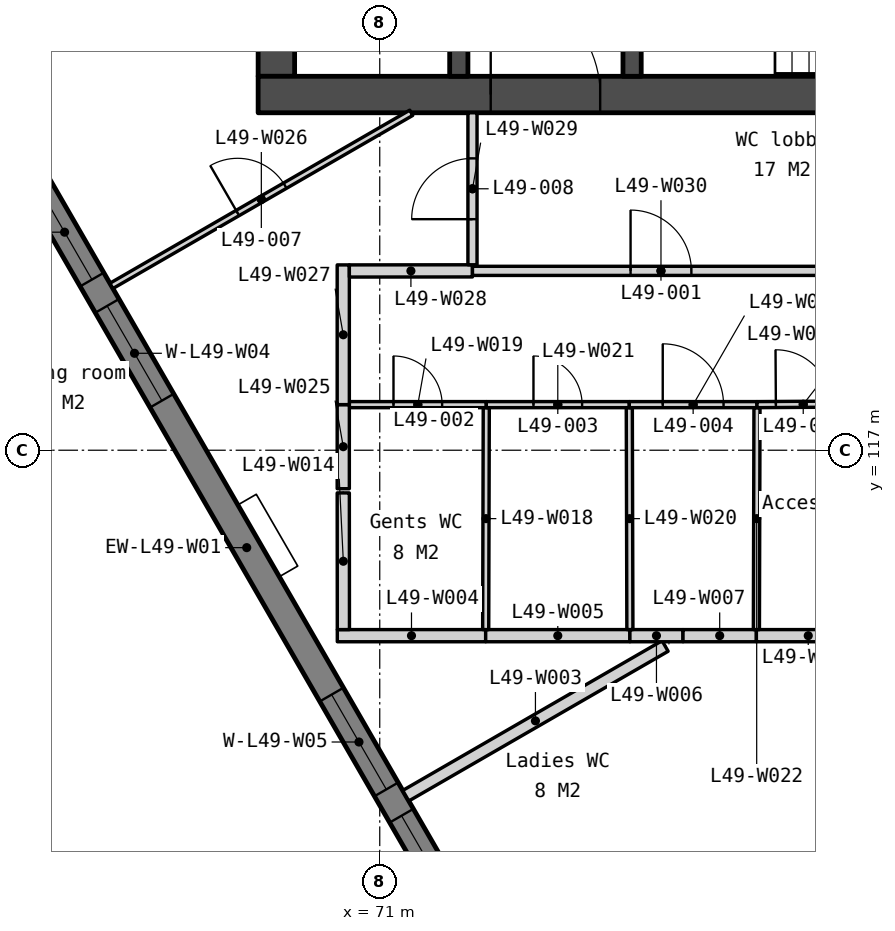
"""IFC4 building model, lengths in metres.
Left out: names, types, materials, properties, quantities, classifications, styles, units other than length and angle.
Written with IfcOpenShell. Run it as: python <this file> out.ifc"""

import sys

from ifc_helpers import new_model, si_unit, direction, frame, frame_2d, origin, place, context, subcontext, project, spatial, polyline, rectangle, outline, extrude, element, fill, save


model = new_model("IFC4")
c1 = context("Model", 3, precision=1e-05, world=origin(), true_north=direction((0.0, 1.0)))
c2 = subcontext(c1, "Body", "Model", "MODEL_VIEW")
j1 = project(units=[si_unit("LENGTHUNIT", "METRE"), si_unit("PLANEANGLEUNIT", "RADIAN")], contexts=[c1])
p1 = place(None, origin())
s1 = spatial("IfcSite", under=j1, at=p1, CompositionType="ELEMENT")
p2 = place(p1, origin())
s2 = spatial("IfcBuilding", under=s1, at=p2, CompositionType="ELEMENT")
p3 = place(p2, frame((0.0, 0.0, 195.8)))
s3 = spatial("IfcBuildingStorey", under=s2, at=p3, CompositionType="ELEMENT", Elevation=195.8)
p4 = place(p3, frame((69.3, 133.95, 0.0), z_axis=(0.0, 0.0, 1.0), x_axis=(0.0, -1.0, 0.0)))
e1 = element("IfcWall", 1, at=p4, inside=s3, PredefinedType="SOLIDWALL", context=c2, shape_type="SweptSolid", body=[
    extrude(rectangle(XDim=10.8, YDim=0.6, at=frame_2d((5.4, 0.0))), origin(), (0.0, 0.0, 1.0), 3.75),
])
p5 = place(p3, frame((69.0, 122.85, 0.0), z_axis=(0.0, 0.0, 1.0), x_axis=(1.0, 0.0, 0.0)))
e2 = element("IfcWall", 2, at=p5, inside=s3, PredefinedType="SOLIDWALL", context=c2, shape_type="SweptSolid", body=[
    extrude(rectangle(XDim=22.0, YDim=0.6, at=frame_2d((11.0, 0.0))), origin(), (0.0, 0.0, 1.0), 3.75),
])
p6 = place(p5, frame((16.375, 0.0, 0.0)))
e3 = element("IfcOpeningElement", 3, at=p6, cuts=e2, PredefinedType="OPENING", context=c2, shape_type="SweptSolid", body=[
    extrude(rectangle(XDim=1.8, YDim=2.1, at=frame_2d((0.9, 1.05))), frame((0.0, 0.31, 0.0), z_axis=(0.0, -1.0, 0.0), x_axis=(1.0, 0.0, 0.0)), (0.0, 0.0, 1.0), 0.62),
])
p7 = place(p5, frame((3.825, 0.0, 0.0)))
e4 = element("IfcOpeningElement", 4, at=p7, cuts=e2, PredefinedType="OPENING", context=c2, shape_type="SweptSolid", body=[
    extrude(rectangle(XDim=1.8, YDim=2.1, at=frame_2d((0.9, 1.05))), frame((0.0, 0.31, 0.0), z_axis=(0.0, -1.0, 0.0), x_axis=(1.0, 0.0, 0.0)), (0.0, 0.0, 1.0), 0.62),
])
p8 = place(p5, frame((12.85, 0.0, 0.0)))
e5 = element("IfcOpeningElement", 5, at=p8, cuts=e2, PredefinedType="OPENING", context=c2, shape_type="SweptSolid", body=[
    extrude(rectangle(XDim=1.5, YDim=2.1, at=frame_2d((0.75, 1.05))), frame((0.0, 0.31, 0.0), z_axis=(0.0, -1.0, 0.0), x_axis=(1.0, 0.0, 0.0)), (0.0, 0.0, 1.0), 0.62),
])
p9 = place(p3, frame((72.3, 133.95, 0.0), z_axis=(0.0, 0.0, 1.0), x_axis=(0.0, -1.0, 0.0)))
e6 = element("IfcWall", 6, at=p9, inside=s3, PredefinedType="SOLIDWALL", context=c2, shape_type="SweptSolid", body=[
    extrude(rectangle(XDim=10.8, YDim=0.3, at=frame_2d((5.4, 0.0))), origin(), (0.0, 0.0, 1.0), 3.75),
])
p10 = place(p9, frame((6.95, 0.0, 0.0)))
e7 = element("IfcOpeningElement", 7, at=p10, cuts=e6, PredefinedType="OPENING", context=c2, shape_type="SweptSolid", body=[
    extrude(rectangle(XDim=1.1, YDim=2.1, at=frame_2d((0.55, 1.05))), frame((0.0, 0.16, 0.0), z_axis=(0.0, -1.0, 0.0), x_axis=(1.0, 0.0, 0.0)), (0.0, 0.0, 1.0), 0.32),
])
p11 = place(p9, frame((9.35, 0.0, 0.0)))
e8 = element("IfcOpeningElement", 8, at=p11, cuts=e6, PredefinedType="OPENING", context=c2, shape_type="SweptSolid", body=[
    extrude(rectangle(XDim=0.9, YDim=2.1, at=frame_2d((0.45, 1.05))), frame((0.0, 0.16, 0.0), z_axis=(0.0, -1.0, 0.0), x_axis=(1.0, 0.0, 0.0)), (0.0, 0.0, 1.0), 0.32),
])
p12 = place(p9, frame((5.1, 0.0, 0.0)))
e9 = element("IfcOpeningElement", 9, at=p12, cuts=e6, PredefinedType="OPENING", context=c2, shape_type="SweptSolid", body=[
    extrude(rectangle(XDim=1.0, YDim=2.1, at=frame_2d((0.5, 1.05))), frame((0.0, 0.16, 0.0), z_axis=(0.0, -1.0, 0.0), x_axis=(1.0, 0.0, 0.0)), (0.0, 0.0, 1.0), 0.32),
])
p13 = place(p3, frame((75.15, 125.7, 0.0), z_axis=(0.0, 0.0, 1.0), x_axis=(0.0, -1.0, 0.0)))
e10 = element("IfcWall", 10, at=p13, inside=s3, PredefinedType="SOLIDWALL", context=c2, shape_type="SweptSolid", body=[
    extrude(rectangle(XDim=2.55, YDim=0.3, at=frame_2d((1.275, 0.0))), origin(), (0.0, 0.0, 1.0), 3.75),
])
p14 = place(p3, frame((59.13, 132.168, -0.15), z_axis=(0.0, 0.0, 1.0), x_axis=(0.500002199942, -0.866024133644, 0.0)))
e11 = element("IfcWall", 11, at=p14, inside=s3, PredefinedType="SOLIDWALL", context=c2, shape_type="SweptSolid", body=[
    extrude(outline(polyline([(38.729, 0.0), (38.729, 3.9), (0.0, 3.9), (0.0, 0.0), (38.729, 0.0)])), frame((0.0, 0.225, 0.0), z_axis=(0.0, -1.0, 0.0), x_axis=(1.0, 0.0, 0.0)), (0.0, 0.0, 1.0), 0.45),
])
p15 = place(p14, frame((2.791, 0.0, 0.95)))
e12 = element("IfcOpeningElement", 12, at=p15, cuts=e11, PredefinedType="OPENING", context=c2, shape_type="SweptSolid", body=[
    extrude(rectangle(XDim=1.8, YDim=2.2, at=frame_2d((0.9, 1.1))), frame((0.0, 0.235, 0.0), z_axis=(0.0, -1.0, 0.0), x_axis=(1.0, 0.0, 0.0)), (0.0, 0.0, 1.0), 0.47),
])
p16 = place(p14, frame((5.091, 0.0, 0.95)))
e13 = element("IfcOpeningElement", 13, at=p16, cuts=e11, PredefinedType="OPENING", context=c2, shape_type="SweptSolid", body=[
    extrude(rectangle(XDim=1.8, YDim=2.2, at=frame_2d((0.9, 1.1))), frame((0.0, 0.235, 0.0), z_axis=(0.0, -1.0, 0.0), x_axis=(1.0, 0.0, 0.0)), (0.0, 0.0, 1.0), 0.47),
])
p17 = place(p14, frame((12.473, 0.0, 0.95)))
e14 = element("IfcOpeningElement", 14, at=p17, cuts=e11, PredefinedType="OPENING", context=c2, shape_type="SweptSolid", body=[
    extrude(rectangle(XDim=1.8, YDim=2.2, at=frame_2d((0.9, 1.1))), frame((0.0, 0.235, 0.0), z_axis=(0.0, -1.0, 0.0), x_axis=(1.0, 0.0, 0.0)), (0.0, 0.0, 1.0), 0.47),
])
p18 = place(p14, frame((14.773, 0.0, 0.95)))
e15 = element("IfcOpeningElement", 15, at=p18, cuts=e11, PredefinedType="OPENING", context=c2, shape_type="SweptSolid", body=[
    extrude(rectangle(XDim=1.8, YDim=2.2, at=frame_2d((0.9, 1.1))), frame((0.0, 0.235, 0.0), z_axis=(0.0, -1.0, 0.0), x_axis=(1.0, 0.0, 0.0)), (0.0, 0.0, 1.0), 0.47),
])
p19 = place(p14, frame((22.156, 0.0, 0.95)))
e16 = element("IfcOpeningElement", 16, at=p19, cuts=e11, PredefinedType="OPENING", context=c2, shape_type="SweptSolid", body=[
    extrude(rectangle(XDim=1.8, YDim=2.2, at=frame_2d((0.9, 1.1))), frame((0.0, 0.235, 0.0), z_axis=(0.0, -1.0, 0.0), x_axis=(1.0, 0.0, 0.0)), (0.0, 0.0, 1.0), 0.47),
])
p20 = place(p14, frame((24.456, 0.0, 0.95)))
e17 = element("IfcOpeningElement", 17, at=p20, cuts=e11, PredefinedType="OPENING", context=c2, shape_type="SweptSolid", body=[
    extrude(rectangle(XDim=1.8, YDim=2.2, at=frame_2d((0.9, 1.1))), frame((0.0, 0.235, 0.0), z_axis=(0.0, -1.0, 0.0), x_axis=(1.0, 0.0, 0.0)), (0.0, 0.0, 1.0), 0.47),
])
p21 = place(p14, frame((31.838, 0.0, 0.95)))
e18 = element("IfcOpeningElement", 18, at=p21, cuts=e11, PredefinedType="OPENING", context=c2, shape_type="SweptSolid", body=[
    extrude(rectangle(XDim=1.8, YDim=2.2, at=frame_2d((0.9, 1.1))), frame((0.0, 0.235, 0.0), z_axis=(0.0, -1.0, 0.0), x_axis=(1.0, 0.0, 0.0)), (0.0, 0.0, 1.0), 0.47),
])
p22 = place(p14, frame((34.138, 0.0, 0.95)))
e19 = element("IfcOpeningElement", 19, at=p22, cuts=e11, PredefinedType="OPENING", context=c2, shape_type="SweptSolid", body=[
    extrude(rectangle(XDim=1.8, YDim=2.2, at=frame_2d((0.9, 1.1))), frame((0.0, 0.235, 0.0), z_axis=(0.0, -1.0, 0.0), x_axis=(1.0, 0.0, 0.0)), (0.0, 0.0, 1.0), 0.47),
])
p23 = place(p3, frame((73.849, 107.125, 0.0), z_axis=(0.0, 0.0, 1.0), x_axis=(0.866035511351, 0.499982492772, 0.0)))
e20 = element("IfcWall", 20, at=p23, inside=s3, PredefinedType="PARTITIONING", context=c2, shape_type="SweptSolid", body=[
    extrude(rectangle(XDim=7.016, YDim=0.1, at=frame_2d((3.508, 0.0))), origin(), (0.0, 0.0, 1.0), 3.75),
])
p24 = place(p3, frame((71.428, 111.318, 0.0), z_axis=(0.0, 0.0, 1.0), x_axis=(0.86601964755, 0.500009969958, 0.0)))
e21 = element("IfcWall", 21, at=p24, inside=s3, PredefinedType="PARTITIONING", context=c2, shape_type="SweptSolid", body=[
    extrude(rectangle(XDim=4.925, YDim=0.2, at=frame_2d((2.462, 0.0))), origin(), (0.0, 0.0, 1.0), 3.75),
])
p25 = place(p3, frame((70.302, 113.95, 0.0), z_axis=(0.0, 0.0, 1.0), x_axis=(1.0, 0.0, 0.0)))
e22 = element("IfcWall", 22, at=p25, inside=s3, PredefinedType="PARTITIONING", context=c2, shape_type="SweptSolid", body=[
    extrude(rectangle(XDim=2.44, YDim=0.2, at=frame_2d((1.22, 0.0))), origin(), (0.0, 0.0, 1.0), 3.75),
])
p26 = place(p3, frame((72.742, 113.95, 0.0), z_axis=(0.0, 0.0, 1.0), x_axis=(1.0, 0.0, 0.0)))
e23 = element("IfcWall", 23, at=p26, inside=s3, PredefinedType="PARTITIONING", context=c2, shape_type="SweptSolid", body=[
    extrude(rectangle(XDim=2.372, YDim=0.2, at=frame_2d((1.186, 0.0))), origin(), (0.0, 0.0, 1.0), 3.75),
])
p27 = place(p3, frame((75.114, 113.95, 0.0), z_axis=(0.0, 0.0, 1.0), x_axis=(1.0, 0.0, 0.0)))
e24 = element("IfcWall", 24, at=p27, inside=s3, PredefinedType="PARTITIONING", context=c2, shape_type="SweptSolid", body=[
    extrude(rectangle(XDim=0.873, YDim=0.2, at=frame_2d((0.437, 0.0))), origin(), (0.0, 0.0, 1.0), 3.75),
])
p28 = place(p3, frame((75.987, 113.95, 0.0), z_axis=(0.0, 0.0, 1.0), x_axis=(1.0, 0.0, 0.0)))
e25 = element("IfcWall", 25, at=p28, inside=s3, PredefinedType="PARTITIONING", context=c2, shape_type="SweptSolid", body=[
    extrude(rectangle(XDim=1.207, YDim=0.2, at=frame_2d((0.604, 0.0))), origin(), (0.0, 0.0, 1.0), 3.75),
])
p29 = place(p3, frame((77.194, 113.95, 0.0), z_axis=(0.0, 0.0, 1.0), x_axis=(1.0, 0.0, 0.0)))
e26 = element("IfcWall", 26, at=p29, inside=s3, PredefinedType="PARTITIONING", context=c2, shape_type="SweptSolid", body=[
    extrude(rectangle(XDim=1.706, YDim=0.2, at=frame_2d((0.853, 0.0))), origin(), (0.0, 0.0, 1.0), 3.75),
])
p30 = place(p3, frame((70.402, 114.05, 0.0), z_axis=(0.0, 0.0, 1.0), x_axis=(-0.000868809403, 0.999999622585, 0.0)))
e27 = element("IfcWall", 27, at=p30, inside=s3, PredefinedType="PARTITIONING", context=c2, shape_type="SweptSolid", body=[
    extrude(rectangle(XDim=2.248, YDim=0.2, at=frame_2d((1.124, 0.0))), origin(), (0.0, 0.0, 1.0), 3.75),
])
p31 = place(p3, frame((72.742, 114.05, 0.0), z_axis=(0.0, 0.0, 1.0), x_axis=(0.002675575707, 0.999996420641, 0.0)))
e28 = element("IfcWall", 28, at=p31, inside=s3, PredefinedType="PARTITIONING", context=c2, shape_type="SweptSolid", body=[
    extrude(rectangle(XDim=3.65, YDim=0.1, at=frame_2d((1.825, 0.0))), origin(), (0.0, 0.0, 1.0), 3.75),
])
p32 = place(p3, frame((70.5, 117.75, 0.0), z_axis=(0.0, 0.0, 1.0), x_axis=(1.0, 0.0, 0.0)))
e29 = element("IfcWall", 29, at=p32, inside=s3, PredefinedType="PARTITIONING", context=c2, shape_type="SweptSolid", body=[
    extrude(rectangle(XDim=2.252, YDim=0.1, at=frame_2d((1.126, 0.0))), origin(), (0.0, 0.0, 1.0), 3.75),
])
p33 = place(p32, frame((0.726, 0.0, 0.0)))
e30 = element("IfcOpeningElement", 30, at=p33, cuts=e29, PredefinedType="OPENING", context=c2, shape_type="SweptSolid", body=[
    extrude(rectangle(XDim=0.8, YDim=2.1, at=frame_2d((0.4, 1.05))), frame((0.0, 0.06, 0.0), z_axis=(0.0, -1.0, 0.0), x_axis=(1.0, 0.0, 0.0)), (0.0, 0.0, 1.0), 0.12),
])
p34 = place(p3, frame((75.114, 114.05, 0.0), z_axis=(0.0, 0.0, 1.0), x_axis=(-0.002608686776, 0.999996597371, 0.0)))
e31 = element("IfcWall", 31, at=p34, inside=s3, PredefinedType="PARTITIONING", context=c2, shape_type="SweptSolid", body=[
    extrude(rectangle(XDim=3.65, YDim=0.1, at=frame_2d((1.825, 0.0))), origin(), (0.0, 0.0, 1.0), 3.75),
])
p35 = place(p3, frame((72.752, 117.75, 0.0), z_axis=(0.0, 0.0, 1.0), x_axis=(1.0, 0.0, 0.0)))
e32 = element("IfcWall", 32, at=p35, inside=s3, PredefinedType="PARTITIONING", context=c2, shape_type="SweptSolid", body=[
    extrude(rectangle(XDim=2.352, YDim=0.1, at=frame_2d((1.176, 0.0))), origin(), (0.0, 0.0, 1.0), 3.75),
])
p36 = place(p35, frame((0.776, 0.0, 0.0)))
e33 = element("IfcOpeningElement", 33, at=p36, cuts=e32, PredefinedType="OPENING", context=c2, shape_type="SweptSolid", body=[
    extrude(rectangle(XDim=0.8, YDim=2.1, at=frame_2d((0.4, 1.05))), frame((0.0, 0.06, 0.0), z_axis=(0.0, -1.0, 0.0), x_axis=(1.0, 0.0, 0.0)), (0.0, 0.0, 1.0), 0.12),
])
p37 = place(p3, frame((77.194, 114.05, 0.0), z_axis=(0.0, 0.0, 1.0), x_axis=(0.002608686776, 0.999996597371, 0.0)))
e34 = element("IfcWall", 34, at=p37, inside=s3, PredefinedType="PARTITIONING", context=c2, shape_type="SweptSolid", body=[
    extrude(rectangle(XDim=3.65, YDim=0.1, at=frame_2d((1.825, 0.0))), origin(), (0.0, 0.0, 1.0), 3.75),
])
p38 = place(p3, frame((75.104, 117.75, 0.0), z_axis=(0.0, 0.0, 1.0), x_axis=(1.0, 0.0, 0.0)))
e35 = element("IfcWall", 35, at=p38, inside=s3, PredefinedType="PARTITIONING", context=c2, shape_type="SweptSolid", body=[
    extrude(rectangle(XDim=2.1, YDim=0.1, at=frame_2d((1.05, 0.0))), origin(), (0.0, 0.0, 1.0), 3.75),
])
p39 = place(p38, frame((0.55, 0.0, 0.0)))
e36 = element("IfcOpeningElement", 36, at=p39, cuts=e35, PredefinedType="OPENING", context=c2, shape_type="SweptSolid", body=[
    extrude(rectangle(XDim=1.0, YDim=2.1, at=frame_2d((0.5, 1.05))), frame((0.0, 0.06, 0.0), z_axis=(0.0, -1.0, 0.0), x_axis=(1.0, 0.0, 0.0)), (0.0, 0.0, 1.0), 0.12),
])
p40 = place(p3, frame((77.204, 117.75, 0.0), z_axis=(0.0, 0.0, 1.0), x_axis=(0.999980406575, 0.006259909447, 0.0)))
e37 = element("IfcWall", 37, at=p40, inside=s3, PredefinedType="PARTITIONING", context=c2, shape_type="SweptSolid", body=[
    extrude(rectangle(XDim=1.521, YDim=0.1, at=frame_2d((0.76, 0.0))), origin(), (0.0, 0.0, 1.0), 3.75),
])
p41 = place(p40, frame((0.311, 0.0, 0.0)))
e38 = element("IfcOpeningElement", 38, at=p41, cuts=e37, PredefinedType="OPENING", context=c2, shape_type="SweptSolid", body=[
    extrude(rectangle(XDim=0.9, YDim=2.1, at=frame_2d((0.45, 1.05))), frame((0.0, 0.06, 0.0), z_axis=(0.0, -1.0, 0.0), x_axis=(1.0, 0.0, 0.0)), (0.0, 0.0, 1.0), 0.12),
])
p42 = place(p3, frame((70.4, 116.367, 0.0), z_axis=(0.0, 0.0, 1.0), x_axis=(0.0, 1.0, 0.0)))
e39 = element("IfcWall", 39, at=p42, inside=s3, PredefinedType="PARTITIONING", context=c2, shape_type="SweptSolid", body=[
    extrude(rectangle(XDim=1.383, YDim=0.2, at=frame_2d((0.692, 0.0))), origin(), (0.0, 0.0, 1.0), 3.75),
])
p43 = place(p3, frame((66.587, 119.703, 0.0), z_axis=(0.0, 0.0, 1.0), x_axis=(0.866023511746, 0.500003277092, 0.0)))
e40 = element("IfcWall", 40, at=p43, inside=s3, PredefinedType="PARTITIONING", context=c2, shape_type="SweptSolid", body=[
    extrude(rectangle(XDim=5.694, YDim=0.1, at=frame_2d((2.847, 0.0))), origin(), (0.0, 0.0, 1.0), 3.75),
])
p44 = place(p43, frame((2.397, 0.0, 0.0)))
e41 = element("IfcOpeningElement", 41, at=p44, cuts=e40, PredefinedType="OPENING", context=c2, shape_type="SweptSolid", body=[
    extrude(rectangle(XDim=0.9, YDim=2.1, at=frame_2d((0.45, 1.05))), frame((0.0, 0.06, 0.0), z_axis=(0.0, -1.0, 0.0), x_axis=(1.0, 0.0, 0.0)), (0.0, 0.0, 1.0), 0.12),
])
p45 = place(p3, frame((70.4, 117.75, 0.0), z_axis=(0.0, 0.0, 1.0), x_axis=(0.0, 1.0, 0.0)))
e42 = element("IfcWall", 42, at=p45, inside=s3, PredefinedType="PARTITIONING", context=c2, shape_type="SweptSolid", body=[
    extrude(rectangle(XDim=2.298, YDim=0.2, at=frame_2d((1.149, 0.0))), origin(), (0.0, 0.0, 1.0), 3.75),
])
p46 = place(p3, frame((70.5, 119.948, 0.0), z_axis=(0.0, 0.0, 1.0), x_axis=(0.999999534819, 0.00096455224, 0.0)))
e43 = element("IfcWall", 43, at=p46, inside=s3, PredefinedType="PARTITIONING", context=c2, shape_type="SweptSolid", body=[
    extrude(rectangle(XDim=2.025, YDim=0.2, at=frame_2d((1.012, 0.0))), origin(), (0.0, 0.0, 1.0), 3.75),
])
p47 = place(p3, frame((72.525, 120.05, 0.0), z_axis=(0.0, 0.0, 1.0), x_axis=(0.0, 1.0, 0.0)))
e44 = element("IfcWall", 44, at=p47, inside=s3, PredefinedType="PARTITIONING", context=c2, shape_type="SweptSolid", body=[
    extrude(rectangle(XDim=2.5, YDim=0.15, at=frame_2d((1.25, 0.0))), origin(), (0.0, 0.0, 1.0), 3.75),
])
p48 = place(p47, frame((0.75, 0.0, 0.0)))
e45 = element("IfcOpeningElement", 45, at=p48, cuts=e44, PredefinedType="OPENING", context=c2, shape_type="SweptSolid", body=[
    extrude(rectangle(XDim=1.0, YDim=2.1, at=frame_2d((0.5, 1.05))), frame((0.0, 0.085, 0.0), z_axis=(0.0, -1.0, 0.0), x_axis=(1.0, 0.0, 0.0)), (0.0, 0.0, 1.0), 0.17),
])
p49 = place(p3, frame((72.525, 119.95, 0.0), z_axis=(0.0, 0.0, 1.0), x_axis=(1.0, 0.0, 0.0)))
e46 = element("IfcWall", 46, at=p49, inside=s3, PredefinedType="PARTITIONING", context=c2, shape_type="SweptSolid", body=[
    extrude(rectangle(XDim=6.2, YDim=0.15, at=frame_2d((3.1, 0.0))), origin(), (0.0, 0.0, 1.0), 3.75),
])
p50 = place(p49, frame((2.6, 0.0, 0.0)))
e47 = element("IfcOpeningElement", 47, at=p50, cuts=e46, PredefinedType="OPENING", context=c2, shape_type="SweptSolid", body=[
    extrude(rectangle(XDim=1.0, YDim=2.1, at=frame_2d((0.5, 1.05))), frame((0.0, 0.085, 0.0), z_axis=(0.0, -1.0, 0.0), x_axis=(1.0, 0.0, 0.0)), (0.0, 0.0, 1.0), 0.17),
])
p51 = place(p7, origin())
e48 = element("IfcDoor", 48, at=p51, inside=s3, OperationType="DOUBLE_DOOR_DOUBLE_SWING", PredefinedType="DOOR", context=c2, shape_type="SweptSolid", body=[
    extrude(rectangle(XDim=1.8, YDim=2.1, at=frame_2d((0.9, 1.05))), frame((0.0, 0.025, 0.0), z_axis=(0.0, -1.0, 0.0), x_axis=(1.0, 0.0, 0.0)), (0.0, 0.0, 1.0), 0.05),
])
fill(e4, e48)
p52 = place(p17, origin())
e49 = element("IfcWindow", 49, at=p52, inside=s3, PartitioningType="SINGLE_PANEL", PredefinedType="WINDOW", context=c2, shape_type="SweptSolid", body=[
    extrude(rectangle(XDim=1.8, YDim=2.2, at=frame_2d((0.9, 1.1))), frame((0.0, 0.03, 0.0), z_axis=(0.0, -1.0, 0.0), x_axis=(1.0, 0.0, 0.0)), (0.0, 0.0, 1.0), 0.06),
])
fill(e14, e49)
p53 = place(p18, origin())
e50 = element("IfcWindow", 50, at=p53, inside=s3, PartitioningType="SINGLE_PANEL", PredefinedType="WINDOW", context=c2, shape_type="SweptSolid", body=[
    extrude(rectangle(XDim=1.8, YDim=2.2, at=frame_2d((0.9, 1.1))), frame((0.0, 0.03, 0.0), z_axis=(0.0, -1.0, 0.0), x_axis=(1.0, 0.0, 0.0)), (0.0, 0.0, 1.0), 0.06),
])
fill(e15, e50)
p54 = place(p19, origin())
e51 = element("IfcWindow", 51, at=p54, inside=s3, PartitioningType="SINGLE_PANEL", PredefinedType="WINDOW", context=c2, shape_type="SweptSolid", body=[
    extrude(rectangle(XDim=1.8, YDim=2.2, at=frame_2d((0.9, 1.1))), frame((0.0, 0.03, 0.0), z_axis=(0.0, -1.0, 0.0), x_axis=(1.0, 0.0, 0.0)), (0.0, 0.0, 1.0), 0.06),
])
fill(e16, e51)
p55 = place(p20, origin())
e52 = element("IfcWindow", 52, at=p55, inside=s3, PartitioningType="SINGLE_PANEL", PredefinedType="WINDOW", context=c2, shape_type="SweptSolid", body=[
    extrude(rectangle(XDim=1.8, YDim=2.2, at=frame_2d((0.9, 1.1))), frame((0.0, 0.03, 0.0), z_axis=(0.0, -1.0, 0.0), x_axis=(1.0, 0.0, 0.0)), (0.0, 0.0, 1.0), 0.06),
])
fill(e17, e52)
p56 = place(p50, origin())
e53 = element("IfcDoor", 53, at=p56, inside=s3, OperationType="SINGLE_SWING_LEFT", PredefinedType="DOOR", context=c2, shape_type="SweptSolid", body=[
    extrude(rectangle(XDim=1.0, YDim=2.1, at=frame_2d((0.5, 1.05))), frame((0.0, 0.025, 0.0), z_axis=(0.0, -1.0, 0.0), x_axis=(1.0, 0.0, 0.0)), (0.0, 0.0, 1.0), 0.05),
])
fill(e47, e53)
p57 = place(p33, origin())
e54 = element("IfcDoor", 54, at=p57, inside=s3, OperationType="SINGLE_SWING_LEFT", PredefinedType="DOOR", context=c2, shape_type="SweptSolid", body=[
    extrude(rectangle(XDim=0.8, YDim=2.1, at=frame_2d((0.4, 1.05))), frame((0.0, 0.025, 0.0), z_axis=(0.0, -1.0, 0.0), x_axis=(1.0, 0.0, 0.0)), (0.0, 0.0, 1.0), 0.05),
])
fill(e30, e54)
p58 = place(p36, origin())
e55 = element("IfcDoor", 55, at=p58, inside=s3, OperationType="SINGLE_SWING_LEFT", PredefinedType="DOOR", context=c2, shape_type="SweptSolid", body=[
    extrude(rectangle(XDim=0.8, YDim=2.1, at=frame_2d((0.4, 1.05))), frame((0.0, 0.025, 0.0), z_axis=(0.0, -1.0, 0.0), x_axis=(1.0, 0.0, 0.0)), (0.0, 0.0, 1.0), 0.05),
])
fill(e33, e55)
p59 = place(p39, origin())
e56 = element("IfcDoor", 56, at=p59, inside=s3, OperationType="SINGLE_SWING_LEFT", PredefinedType="DOOR", context=c2, shape_type="SweptSolid", body=[
    extrude(rectangle(XDim=1.0, YDim=2.1, at=frame_2d((0.5, 1.05))), frame((0.0, 0.025, 0.0), z_axis=(0.0, -1.0, 0.0), x_axis=(1.0, 0.0, 0.0)), (0.0, 0.0, 1.0), 0.05),
])
fill(e36, e56)
p60 = place(p41, origin())
e57 = element("IfcDoor", 57, at=p60, inside=s3, OperationType="SINGLE_SWING_LEFT", PredefinedType="DOOR", context=c2, shape_type="SweptSolid", body=[
    extrude(rectangle(XDim=0.9, YDim=2.1, at=frame_2d((0.45, 1.05))), frame((0.0, 0.025, 0.0), z_axis=(0.0, -1.0, 0.0), x_axis=(1.0, 0.0, 0.0)), (0.0, 0.0, 1.0), 0.05),
])
fill(e38, e57)
p61 = place(p44, origin())
e58 = element("IfcDoor", 58, at=p61, inside=s3, OperationType="SINGLE_SWING_LEFT", PredefinedType="DOOR", context=c2, shape_type="SweptSolid", body=[
    extrude(rectangle(XDim=0.9, YDim=2.1, at=frame_2d((0.45, 1.05))), frame((0.0, 0.025, 0.0), z_axis=(0.0, -1.0, 0.0), x_axis=(1.0, 0.0, 0.0)), (0.0, 0.0, 1.0), 0.05),
])
fill(e41, e58)
p62 = place(p48, origin())
e59 = element("IfcDoor", 59, at=p62, inside=s3, OperationType="SINGLE_SWING_LEFT", PredefinedType="DOOR", context=c2, shape_type="SweptSolid", body=[
    extrude(rectangle(XDim=1.0, YDim=2.1, at=frame_2d((0.5, 1.05))), frame((0.0, 0.025, 0.0), z_axis=(0.0, -1.0, 0.0), x_axis=(1.0, 0.0, 0.0)), (0.0, 0.0, 1.0), 0.05),
])
fill(e45, e59)
save(model, sys.argv[1])
